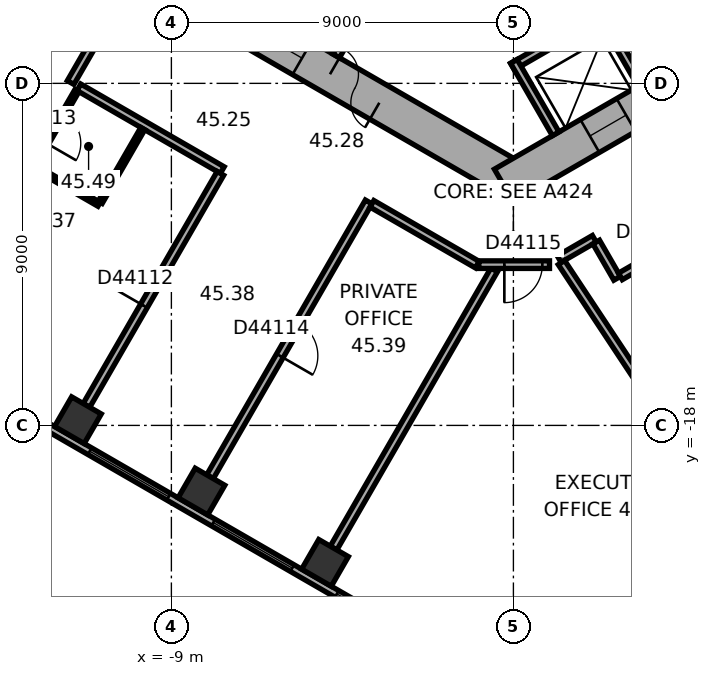
"""IFC4 building model, lengths in metres.
Left out: names, types, materials, properties, quantities, classifications, styles, units other than length and angle.
Written with IfcOpenShell. Run it as: python <this file> out.ifc"""

import sys

from ifc_helpers import new_model, si_unit, direction, frame, frame_2d, origin, origin_2d, place, context, subcontext, project, spatial, rectangle, extrude, element, fill, save


model = new_model("IFC4")
c1 = context("Model", 3, precision=1e-05, world=origin(), true_north=direction((0.0, 1.0)))
c2 = subcontext(c1, "Body", "Model", "MODEL_VIEW")
j1 = project(units=[si_unit("LENGTHUNIT", "METRE"), si_unit("PLANEANGLEUNIT", "RADIAN")], contexts=[c1])
p1 = place(None, origin())
s1 = spatial("IfcSite", under=j1, at=p1, CompositionType="ELEMENT")
p2 = place(p1, origin())
s2 = spatial("IfcBuilding", under=s1, at=p2, CompositionType="ELEMENT")
p3 = place(p2, frame((0.0, 0.0, 183.6)))
s3 = spatial("IfcBuildingStorey", under=s2, at=p3, CompositionType="ELEMENT", Elevation=183.6)
for number, where, z_axis, x_axis in (
    (1, (-11.46, -17.863, 0.0), (0.0, 0.0, 1.0), (0.866, -0.5, 0.0)),
    (2, (-8.208, -19.74, 0.0), (0.0, 0.0, 1.0), (0.866, -0.5, 0.0)),
    (3, (-4.958, -21.617, 0.0), (0.0, 0.0, 1.0), (0.866, -0.5, 0.0)),
):
    element("IfcColumn", number, at=place(p3, frame(where, z_axis=z_axis, x_axis=x_axis)), inside=s3, PredefinedType="COLUMN", context=c2, shape_type="SweptSolid", body=[
        extrude(rectangle(XDim=0.9, YDim=0.9, at=origin_2d()), origin(), (0.0, 0.0, 1.0), 3.7),
    ])
p4 = place(p3, frame((-10.25, -5.629, 0.0), z_axis=(0.0, 0.0, 1.0), x_axis=(0.866022616891, -0.50000482701, 0.0)))
e4 = element("IfcWall", 4, at=p4, inside=s3, PredefinedType="SHEAR", context=c2, shape_type="SweptSolid", body=[
    extrude(rectangle(XDim=12.125, YDim=1.0, at=frame_2d((6.062, 0.0))), origin(), (0.0, 0.0, 1.0), 3.7),
])
p5 = place(p4, frame((6.262, 0.0, 0.0)))
e5 = element("IfcOpeningElement", 5, at=p5, cuts=e4, PredefinedType="OPENING", context=c2, shape_type="SweptSolid", body=[
    extrude(rectangle(XDim=1.5, YDim=2.1, at=frame_2d((0.75, 1.05))), frame((0.0, 0.51, 0.0), z_axis=(0.0, -1.0, 0.0), x_axis=(1.0, 0.0, 0.0)), (0.0, 0.0, 1.0), 1.02),
])
p6 = place(p4, frame((1.712, 0.0, 0.0)))
e6 = element("IfcOpeningElement", 6, at=p6, cuts=e4, PredefinedType="OPENING", context=c2, shape_type="SweptSolid", body=[
    extrude(rectangle(XDim=1.1, YDim=2.1, at=frame_2d((0.55, 1.05))), frame((0.0, 0.51, 0.0), z_axis=(0.0, -1.0, 0.0), x_axis=(1.0, 0.0, 0.0)), (0.0, 0.0, 1.0), 1.02),
])
p7 = place(p4, frame((4.312, 0.0, 0.0)))
e7 = element("IfcOpeningElement", 7, at=p7, cuts=e4, PredefinedType="OPENING", context=c2, shape_type="SweptSolid", body=[
    extrude(rectangle(XDim=1.1, YDim=2.1, at=frame_2d((0.55, 1.05))), frame((0.0, 0.51, 0.0), z_axis=(0.0, -1.0, 0.0), x_axis=(1.0, 0.0, 0.0)), (0.0, 0.0, 1.0), 1.02),
])
p8 = place(p3, frame((-0.25, -11.691, 0.0), z_axis=(0.0, 0.0, 1.0), x_axis=(0.866022616891, 0.50000482701, 0.0)))
e8 = element("IfcWall", 8, at=p8, inside=s3, PredefinedType="SHEAR", context=c2, shape_type="SweptSolid", body=[
    extrude(rectangle(XDim=12.125, YDim=1.0, at=frame_2d((6.062, 0.0))), origin(), (0.0, 0.0, 1.0), 3.7),
])
p9 = place(p8, frame((2.612, 0.0, 0.0)))
e9 = element("IfcOpeningElement", 9, at=p9, cuts=e8, PredefinedType="OPENING", context=c2, shape_type="SweptSolid", body=[
    extrude(rectangle(XDim=1.1, YDim=2.1, at=frame_2d((0.55, 1.05))), frame((0.0, 0.51, 0.0), z_axis=(0.0, -1.0, 0.0), x_axis=(1.0, 0.0, 0.0)), (0.0, 0.0, 1.0), 1.02),
])
p10 = place(p8, frame((5.212, 0.0, 0.0)))
e10 = element("IfcOpeningElement", 10, at=p10, cuts=e8, PredefinedType="OPENING", context=c2, shape_type="SweptSolid", body=[
    extrude(rectangle(XDim=1.1, YDim=2.1, at=frame_2d((0.55, 1.05))), frame((0.0, 0.51, 0.0), z_axis=(0.0, -1.0, 0.0), x_axis=(1.0, 0.0, 0.0)), (0.0, 0.0, 1.0), 1.02),
])
p11 = place(p8, frame((7.812, 0.0, 0.0)))
e11 = element("IfcOpeningElement", 11, at=p11, cuts=e8, PredefinedType="OPENING", context=c2, shape_type="SweptSolid", body=[
    extrude(rectangle(XDim=1.1, YDim=2.1, at=frame_2d((0.55, 1.05))), frame((0.0, 0.51, 0.0), z_axis=(0.0, -1.0, 0.0), x_axis=(1.0, 0.0, 0.0)), (0.0, 0.0, 1.0), 1.02),
])
p12 = place(p3, frame((-18.789, -14.267, 0.0), z_axis=(0.0, 0.0, 1.0), x_axis=(0.866023315909, -0.500003616288, 0.0)))
e12 = element("IfcWall", 12, at=p12, inside=s3, PredefinedType="STANDARD", context=c2, shape_type="SweptSolid", body=[
    extrude(rectangle(XDim=20.044, YDim=0.2, at=frame_2d((10.022, 0.0))), origin(), (0.0, 0.0, 1.0), 3.7),
])
p13 = place(p12, frame((1.314, 0.0, 0.9)))
e13 = element("IfcOpeningElement", 13, at=p13, cuts=e12, PredefinedType="OPENING", context=c2, shape_type="SweptSolid", body=[
    extrude(rectangle(XDim=2.4, YDim=2.0, at=frame_2d((1.2, 1.0))), frame((0.0, 0.11, 0.0), z_axis=(0.0, -1.0, 0.0), x_axis=(1.0, 0.0, 0.0)), (0.0, 0.0, 1.0), 0.22),
])
p14 = place(p12, frame((5.069, 0.0, 0.9)))
e14 = element("IfcOpeningElement", 14, at=p14, cuts=e12, PredefinedType="OPENING", context=c2, shape_type="SweptSolid", body=[
    extrude(rectangle(XDim=2.4, YDim=2.0, at=frame_2d((1.2, 1.0))), frame((0.0, 0.11, 0.0), z_axis=(0.0, -1.0, 0.0), x_axis=(1.0, 0.0, 0.0)), (0.0, 0.0, 1.0), 0.22),
])
p15 = place(p12, frame((8.823, 0.0, 0.9)))
e15 = element("IfcOpeningElement", 15, at=p15, cuts=e12, PredefinedType="OPENING", context=c2, shape_type="SweptSolid", body=[
    extrude(rectangle(XDim=2.4, YDim=2.0, at=frame_2d((1.2, 1.0))), frame((0.0, 0.11, 0.0), z_axis=(0.0, -1.0, 0.0), x_axis=(1.0, 0.0, 0.0)), (0.0, 0.0, 1.0), 0.22),
])
p16 = place(p12, frame((12.577, 0.0, 0.9)))
e16 = element("IfcOpeningElement", 16, at=p16, cuts=e12, PredefinedType="OPENING", context=c2, shape_type="SweptSolid", body=[
    extrude(rectangle(XDim=2.4, YDim=2.0, at=frame_2d((1.2, 1.0))), frame((0.0, 0.11, 0.0), z_axis=(0.0, -1.0, 0.0), x_axis=(1.0, 0.0, 0.0)), (0.0, 0.0, 1.0), 0.22),
])
p17 = place(p12, frame((16.331, 0.0, 0.9)))
e17 = element("IfcOpeningElement", 17, at=p17, cuts=e12, PredefinedType="OPENING", context=c2, shape_type="SweptSolid", body=[
    extrude(rectangle(XDim=2.4, YDim=2.0, at=frame_2d((1.2, 1.0))), frame((0.0, 0.11, 0.0), z_axis=(0.0, -1.0, 0.0), x_axis=(1.0, 0.0, 0.0)), (0.0, 0.0, 1.0), 0.22),
])
p18 = place(p3, frame((2.911, -24.156, 0.0), z_axis=(0.0, 0.0, 1.0), x_axis=(0.833882163564, 0.551942512668, 0.0)))
e18 = element("IfcWall", 18, at=p18, inside=s3, PredefinedType="STANDARD", context=c2, shape_type="SweptSolid", body=[
    extrude(rectangle(XDim=20.044, YDim=0.2, at=frame_2d((10.022, 0.0))), origin(), (0.0, 0.0, 1.0), 3.7),
])
p19 = place(p18, frame((1.313, 0.0, 0.9)))
e19 = element("IfcOpeningElement", 19, at=p19, cuts=e18, PredefinedType="OPENING", context=c2, shape_type="SweptSolid", body=[
    extrude(rectangle(XDim=2.4, YDim=2.0, at=frame_2d((1.2, 1.0))), frame((0.0, 0.11, 0.0), z_axis=(0.0, -1.0, 0.0), x_axis=(1.0, 0.0, 0.0)), (0.0, 0.0, 1.0), 0.22),
])
p20 = place(p18, frame((5.067, 0.0, 0.9)))
e20 = element("IfcOpeningElement", 20, at=p20, cuts=e18, PredefinedType="OPENING", context=c2, shape_type="SweptSolid", body=[
    extrude(rectangle(XDim=2.4, YDim=2.0, at=frame_2d((1.2, 1.0))), frame((0.0, 0.11, 0.0), z_axis=(0.0, -1.0, 0.0), x_axis=(1.0, 0.0, 0.0)), (0.0, 0.0, 1.0), 0.22),
])
p21 = place(p18, frame((8.821, 0.0, 0.9)))
e21 = element("IfcOpeningElement", 21, at=p21, cuts=e18, PredefinedType="OPENING", context=c2, shape_type="SweptSolid", body=[
    extrude(rectangle(XDim=2.4, YDim=2.0, at=frame_2d((1.2, 1.0))), frame((0.0, 0.11, 0.0), z_axis=(0.0, -1.0, 0.0), x_axis=(1.0, 0.0, 0.0)), (0.0, 0.0, 1.0), 0.22),
])
p22 = place(p18, frame((12.575, 0.0, 0.9)))
e22 = element("IfcOpeningElement", 22, at=p22, cuts=e18, PredefinedType="OPENING", context=c2, shape_type="SweptSolid", body=[
    extrude(rectangle(XDim=2.4, YDim=2.0, at=frame_2d((1.2, 1.0))), frame((0.0, 0.11, 0.0), z_axis=(0.0, -1.0, 0.0), x_axis=(1.0, 0.0, 0.0)), (0.0, 0.0, 1.0), 0.22),
])
p23 = place(p18, frame((16.329, 0.0, 0.9)))
e23 = element("IfcOpeningElement", 23, at=p23, cuts=e18, PredefinedType="OPENING", context=c2, shape_type="SweptSolid", body=[
    extrude(rectangle(XDim=2.4, YDim=2.0, at=frame_2d((1.2, 1.0))), frame((0.0, 0.11, 0.0), z_axis=(0.0, -1.0, 0.0), x_axis=(1.0, 0.0, 0.0)), (0.0, 0.0, 1.0), 0.22),
])
p24 = place(p3, frame((-3.563, -6.372, 0.0), z_axis=(0.0, 0.0, 1.0), x_axis=(-0.499994660107, -0.866028486751, 0.0)))
e24 = element("IfcWall", 24, at=p24, inside=s3, PredefinedType="PARTITIONING", context=c2, shape_type="SweptSolid", body=[
    extrude(rectangle(XDim=2.2, YDim=0.2, at=frame_2d((1.1, 0.0))), origin(), (0.0, 0.0, 1.0), 3.42),
])
p25 = place(p3, frame((-0.024, -8.559, 0.0), z_axis=(0.0, 0.0, 1.0), x_axis=(0.866026010844, 0.49999894854, 0.0)))
e25 = element("IfcWall", 25, at=p25, inside=s3, PredefinedType="PARTITIONING", context=c2, shape_type="SweptSolid", body=[
    extrude(rectangle(XDim=8.0, YDim=0.2, at=frame_2d((4.0, 0.0))), origin(), (0.0, 0.0, 1.0), 3.42),
])
for number, where, z_axis, x_axis in (
    (26, (0.013, -8.422, 0.0), (0.0, 0.0, 1.0), (0.5, -0.866, 0.0)),
    (27, (2.264, -7.122, 0.0), (0.0, 0.0, 1.0), (0.5, -0.866, 0.0)),
):
    element("IfcWall", number, at=place(p3, frame(where, z_axis=z_axis, x_axis=x_axis)), inside=s3, PredefinedType="PARTITIONING", context=c2, shape_type="SweptSolid", body=[
        extrude(rectangle(XDim=2.2, YDim=0.2, at=frame_2d((1.1, 0.0))), origin(), (0.0, 0.0, 1.0), 3.42),
    ])
p26 = place(p3, frame((-12.635, -11.182, 0.0), z_axis=(0.0, 0.0, 1.0), x_axis=(0.499952165731, 0.866053019151, 0.0)))
e28 = element("IfcWall", 28, at=p26, inside=s3, PredefinedType="PARTITIONING", context=c2, shape_type="SweptSolid", body=[
    extrude(rectangle(XDim=2.3, YDim=0.12, at=frame_2d((1.15, 0.0))), origin(), (0.0, 0.0, 1.0), 3.42),
])
p27 = place(p26, frame((0.7, 0.0, 0.0)))
e29 = element("IfcOpeningElement", 29, at=p27, cuts=e28, PredefinedType="OPENING", context=c2, shape_type="SweptSolid", body=[
    extrude(rectangle(XDim=0.9, YDim=2.1, at=frame_2d((0.45, 1.05))), frame((0.0, 0.07, 0.0), z_axis=(0.0, -1.0, 0.0), x_axis=(1.0, 0.0, 0.0)), (0.0, 0.0, 1.0), 0.14),
])
p28 = place(p3, frame((-11.435, -9.103, 0.0), z_axis=(0.0, 0.0, 1.0), x_axis=(0.866007399799, -0.500031182522, 0.0)))
e30 = element("IfcWall", 30, at=p28, inside=s3, PredefinedType="PARTITIONING", context=c2, shape_type="SweptSolid", body=[
    extrude(rectangle(XDim=4.358, YDim=0.2, at=frame_2d((2.179, 0.0))), origin(), (0.0, 0.0, 1.0), 3.42),
])
p29 = place(p3, frame((-11.235, -17.474, 0.0), z_axis=(0.0, 0.0, 1.0), x_axis=(0.500009260695, 0.866020057054, 0.0)))
e31 = element("IfcWall", 31, at=p29, inside=s3, PredefinedType="PARTITIONING", context=c2, shape_type="SweptSolid", body=[
    extrude(rectangle(XDim=7.049, YDim=0.2, at=frame_2d((3.524, 0.0))), origin(), (0.0, 0.0, 1.0), 2.87),
])
p30 = place(p29, frame((3.024, 0.0, 0.0)))
e32 = element("IfcOpeningElement", 32, at=p30, cuts=e31, PredefinedType="OPENING", context=c2, shape_type="SweptSolid", body=[
    extrude(rectangle(XDim=1.0, YDim=2.1, at=frame_2d((0.5, 1.05))), frame((0.0, 0.11, 0.0), z_axis=(0.0, -1.0, 0.0), x_axis=(1.0, 0.0, 0.0)), (0.0, 0.0, 1.0), 0.22),
])
p31 = place(p3, frame((-11.101, -8.025, 0.0), z_axis=(0.0, 0.0, 1.0), x_axis=(-0.500074377092, -0.865982457891, 0.0)))
e33 = element("IfcWall", 33, at=p31, inside=s3, PredefinedType="PARTITIONING", context=c2, shape_type="SweptSolid", body=[
    extrude(rectangle(XDim=1.101, YDim=0.2, at=frame_2d((0.55, 0.0))), origin(), (0.0, 0.0, 1.0), 3.42),
])
p32 = place(p3, frame((-10.903, -12.182, 0.0), z_axis=(0.0, 0.0, 1.0), x_axis=(-0.866011626733, 0.500023861795, 0.0)))
e34 = element("IfcWall", 34, at=p32, inside=s3, PredefinedType="PARTITIONING", context=c2, shape_type="SweptSolid", body=[
    extrude(rectangle(XDim=1.94, YDim=0.12, at=frame_2d((0.97, 0.0))), origin(), (0.0, 0.0, 1.0), 3.42),
])
p33 = place(p3, frame((-9.753, -10.19, 0.0), z_axis=(0.0, 0.0, 1.0), x_axis=(-0.49994888933, -0.866054910533, 0.0)))
e35 = element("IfcWall", 35, at=p33, inside=s3, PredefinedType="PARTITIONING", context=c2, shape_type="SweptSolid", body=[
    extrude(rectangle(XDim=2.24, YDim=0.12, at=frame_2d((1.12, 0.0))), origin(), (0.0, 0.0, 1.0), 3.42),
])
p34 = place(p3, frame((-7.984, -19.351, 0.0), z_axis=(0.0, 0.0, 1.0), x_axis=(0.500010139422, 0.866019549707, 0.0)))
e36 = element("IfcWall", 36, at=p34, inside=s3, PredefinedType="PARTITIONING", context=c2, shape_type="SweptSolid", body=[
    extrude(rectangle(XDim=8.35, YDim=0.2, at=frame_2d((4.175, 0.0))), origin(), (0.0, 0.0, 1.0), 3.42),
])
p35 = place(p34, frame((3.675, 0.0, 0.0)))
e37 = element("IfcOpeningElement", 37, at=p35, cuts=e36, PredefinedType="OPENING", context=c2, shape_type="SweptSolid", body=[
    extrude(rectangle(XDim=1.0, YDim=2.1, at=frame_2d((0.5, 1.05))), frame((0.0, 0.11, 0.0), z_axis=(0.0, -1.0, 0.0), x_axis=(1.0, 0.0, 0.0)), (0.0, 0.0, 1.0), 0.22),
])
p36 = place(p3, frame((-4.732, -21.228, 0.0), z_axis=(0.0, 0.0, 1.0), x_axis=(0.500000843414, 0.866024916838, 0.0)))
e38 = element("IfcWall", 38, at=p36, inside=s3, PredefinedType="PARTITIONING", context=c2, shape_type="SweptSolid", body=[
    extrude(rectangle(XDim=8.452, YDim=0.2, at=frame_2d((4.226, 0.0))), origin(), (0.0, 0.0, 1.0), 3.42),
])
p37 = place(p3, frame((-3.722, -12.169, 0.0), z_axis=(0.0, 0.0, 1.0), x_axis=(0.866033163891, -0.499986558861, 0.0)))
e39 = element("IfcWall", 39, at=p37, inside=s3, PredefinedType="PARTITIONING", context=c2, shape_type="SweptSolid", body=[
    extrude(rectangle(XDim=3.201, YDim=0.2, at=frame_2d((1.6, 0.0))), origin(), (0.0, 0.0, 1.0), 3.42),
])
p38 = place(p3, frame((-0.91, -13.77, 0.0), z_axis=(0.0, 0.0, 1.0), x_axis=(1.0, 0.0, 0.0)))
e40 = element("IfcWall", 40, at=p38, inside=s3, PredefinedType="PARTITIONING", context=c2, shape_type="SweptSolid", body=[
    extrude(rectangle(XDim=1.86, YDim=0.2, at=frame_2d((0.93, 0.0))), origin(), (0.0, 0.0, 1.0), 3.42),
])
p39 = place(p38, frame((0.672, 0.0, 0.0)))
e41 = element("IfcOpeningElement", 41, at=p39, cuts=e40, PredefinedType="OPENING", context=c2, shape_type="SweptSolid", body=[
    extrude(rectangle(XDim=1.0, YDim=2.1, at=frame_2d((0.5, 1.05))), frame((0.0, 0.11, 0.0), z_axis=(0.0, -1.0, 0.0), x_axis=(1.0, 0.0, 0.0)), (0.0, 0.0, 1.0), 0.22),
])
p40 = place(p3, frame((1.204, -13.623, 0.0), z_axis=(0.0, 0.0, 1.0), x_axis=(0.866040989419, 0.499973003918, 0.0)))
e42 = element("IfcWall", 42, at=p40, inside=s3, PredefinedType="PARTITIONING", context=c2, shape_type="SweptSolid", body=[
    extrude(rectangle(XDim=1.068, YDim=0.2, at=frame_2d((0.534, 0.0))), origin(), (0.0, 0.0, 1.0), 3.42),
])
p41 = place(p3, frame((2.179, -13.176, 0.0), z_axis=(0.0, 0.0, 1.0), x_axis=(0.499978356969, -0.866037899034, 0.0)))
e43 = element("IfcWall", 43, at=p41, inside=s3, PredefinedType="PARTITIONING", context=c2, shape_type="SweptSolid", body=[
    extrude(rectangle(XDim=1.101, YDim=0.2, at=frame_2d((0.551, 0.0))), origin(), (0.0, 0.0, 1.0), 3.42),
])
p42 = place(p3, frame((2.816, -14.079, 0.0), z_axis=(0.0, 0.0, 1.0), x_axis=(0.866008705299, 0.50002892151, 0.0)))
e44 = element("IfcWall", 44, at=p42, inside=s3, PredefinedType="PARTITIONING", context=c2, shape_type="SweptSolid", body=[
    extrude(rectangle(XDim=2.666, YDim=0.2, at=frame_2d((1.333, 0.0))), origin(), (0.0, 0.0, 1.0), 3.42),
])
p43 = place(p42, frame((0.833, 0.0, 0.0)))
e45 = element("IfcOpeningElement", 45, at=p43, cuts=e44, PredefinedType="OPENING", context=c2, shape_type="SweptSolid", body=[
    extrude(rectangle(XDim=1.0, YDim=2.1, at=frame_2d((0.5, 1.05))), frame((0.0, 0.11, 0.0), z_axis=(0.0, -1.0, 0.0), x_axis=(1.0, 0.0, 0.0)), (0.0, 0.0, 1.0), 0.22),
])
p44 = place(p3, frame((6.02, -20.899, 0.0), z_axis=(0.0, 0.0, 1.0), x_axis=(-0.551943990108, 0.833881185651, 0.0)))
e46 = element("IfcWall", 46, at=p44, inside=s3, PredefinedType="PARTITIONING", context=c2, shape_type="SweptSolid", body=[
    extrude(rectangle(XDim=8.615, YDim=0.2, at=frame_2d((4.308, 0.0))), origin(), (0.0, 0.0, 1.0), 3.42),
])
p45 = place(p15, origin())
e47 = element("IfcWindow", 47, at=p45, inside=s3, PartitioningType="SINGLE_PANEL", PredefinedType="WINDOW", context=c2, shape_type="SweptSolid", body=[
    extrude(rectangle(XDim=2.4, YDim=2.0, at=frame_2d((1.2, 1.0))), frame((0.0, 0.03, 0.0), z_axis=(0.0, -1.0, 0.0), x_axis=(1.0, 0.0, 0.0)), (0.0, 0.0, 1.0), 0.06),
])
fill(e15, e47)
p46 = place(p16, origin())
e48 = element("IfcWindow", 48, at=p46, inside=s3, PartitioningType="SINGLE_PANEL", PredefinedType="WINDOW", context=c2, shape_type="SweptSolid", body=[
    extrude(rectangle(XDim=2.4, YDim=2.0, at=frame_2d((1.2, 1.0))), frame((0.0, 0.03, 0.0), z_axis=(0.0, -1.0, 0.0), x_axis=(1.0, 0.0, 0.0)), (0.0, 0.0, 1.0), 0.06),
])
fill(e16, e48)
p47 = place(p17, origin())
e49 = element("IfcWindow", 49, at=p47, inside=s3, PartitioningType="SINGLE_PANEL", PredefinedType="WINDOW", context=c2, shape_type="SweptSolid", body=[
    extrude(rectangle(XDim=2.4, YDim=2.0, at=frame_2d((1.2, 1.0))), frame((0.0, 0.03, 0.0), z_axis=(0.0, -1.0, 0.0), x_axis=(1.0, 0.0, 0.0)), (0.0, 0.0, 1.0), 0.06),
])
fill(e17, e49)
p48 = place(p5, origin())
e50 = element("IfcDoor", 50, at=p48, inside=s3, OperationType="DOUBLE_DOOR_SINGLE_SWING", PredefinedType="DOOR", context=c2, shape_type="SweptSolid", body=[
    extrude(rectangle(XDim=1.5, YDim=2.1, at=frame_2d((0.75, 1.05))), frame((0.0, 0.025, 0.0), z_axis=(0.0, -1.0, 0.0), x_axis=(1.0, 0.0, 0.0)), (0.0, 0.0, 1.0), 0.05),
])
fill(e5, e50)
p49 = place(p7, origin())
e51 = element("IfcDoor", 51, at=p49, inside=s3, OperationType="DOUBLE_DOOR_SLIDING", PredefinedType="DOOR", context=c2, shape_type="SweptSolid", body=[
    extrude(rectangle(XDim=1.1, YDim=2.1, at=frame_2d((0.55, 1.05))), frame((0.0, 0.025, 0.0), z_axis=(0.0, -1.0, 0.0), x_axis=(1.0, 0.0, 0.0)), (0.0, 0.0, 1.0), 0.05),
])
fill(e7, e51)
p50 = place(p9, origin())
e52 = element("IfcDoor", 52, at=p50, inside=s3, OperationType="DOUBLE_DOOR_SLIDING", PredefinedType="DOOR", context=c2, shape_type="SweptSolid", body=[
    extrude(rectangle(XDim=1.1, YDim=2.1, at=frame_2d((0.55, 1.05))), frame((0.0, 0.025, 0.0), z_axis=(0.0, -1.0, 0.0), x_axis=(1.0, 0.0, 0.0)), (0.0, 0.0, 1.0), 0.05),
])
fill(e9, e52)
p51 = place(p30, origin())
e53 = element("IfcDoor", 53, at=p51, inside=s3, OperationType="SINGLE_SWING_LEFT", PredefinedType="DOOR", context=c2, shape_type="SweptSolid", body=[
    extrude(rectangle(XDim=1.0, YDim=2.1, at=frame_2d((0.5, 1.05))), frame((0.0, 0.025, 0.0), z_axis=(0.0, -1.0, 0.0), x_axis=(1.0, 0.0, 0.0)), (0.0, 0.0, 1.0), 0.05),
])
fill(e32, e53)
p52 = place(p27, origin())
e54 = element("IfcDoor", 54, at=p52, inside=s3, OperationType="SINGLE_SWING_LEFT", PredefinedType="DOOR", context=c2, shape_type="SweptSolid", body=[
    extrude(rectangle(XDim=0.9, YDim=2.1, at=frame_2d((0.45, 1.05))), frame((0.0, 0.025, 0.0), z_axis=(0.0, -1.0, 0.0), x_axis=(1.0, 0.0, 0.0)), (0.0, 0.0, 1.0), 0.05),
])
fill(e29, e54)
p53 = place(p35, origin())
e55 = element("IfcDoor", 55, at=p53, inside=s3, OperationType="SINGLE_SWING_LEFT", PredefinedType="DOOR", context=c2, shape_type="SweptSolid", body=[
    extrude(rectangle(XDim=1.0, YDim=2.1, at=frame_2d((0.5, 1.05))), frame((0.0, 0.025, 0.0), z_axis=(0.0, -1.0, 0.0), x_axis=(1.0, 0.0, 0.0)), (0.0, 0.0, 1.0), 0.05),
])
fill(e37, e55)
p54 = place(p39, origin())
e56 = element("IfcDoor", 56, at=p54, inside=s3, OperationType="SINGLE_SWING_LEFT", PredefinedType="DOOR", context=c2, shape_type="SweptSolid", body=[
    extrude(rectangle(XDim=1.0, YDim=2.1, at=frame_2d((0.5, 1.05))), frame((0.0, 0.025, 0.0), z_axis=(0.0, -1.0, 0.0), x_axis=(1.0, 0.0, 0.0)), (0.0, 0.0, 1.0), 0.05),
])
fill(e41, e56)
save(model, sys.argv[1])
